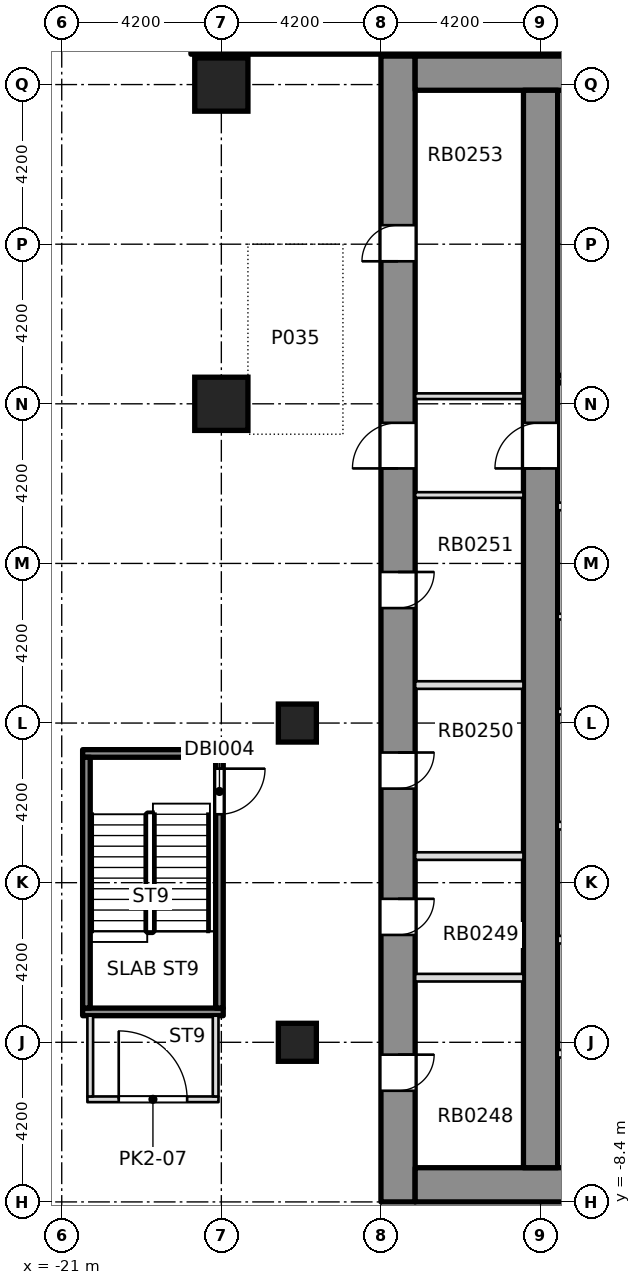
"""IFC4 building model, lengths in metres.
Left out: names, types, materials, properties, quantities, classifications, styles, units other than length and angle.
Written with IfcOpenShell. Run it as: python <this file> out.ifc"""

import sys

from ifc_helpers import new_model, si_unit, direction, frame, frame_2d, origin, origin_2d, place, context, subcontext, project, spatial, polyline, rectangle, outline, extrude, element, fill, save


model = new_model("IFC4")
c1 = context("Model", 3, precision=1e-05, world=origin(), true_north=direction((0.0, 1.0)))
c2 = subcontext(c1, "Body", "Model", "MODEL_VIEW")
j1 = project(units=[si_unit("LENGTHUNIT", "METRE"), si_unit("PLANEANGLEUNIT", "RADIAN")], contexts=[c1])
p1 = place(None, origin())
s1 = spatial("IfcSite", under=j1, at=p1, CompositionType="ELEMENT")
p2 = place(p1, origin())
s2 = spatial("IfcBuilding", under=s1, at=p2, CompositionType="ELEMENT")
p3 = place(p2, frame((0.0, 0.0, -8.4)))
s3 = spatial("IfcBuildingStorey", under=s2, at=p3, CompositionType="ELEMENT", Elevation=-8.4)
p4 = place(p3, frame((-12.15, -8.4, 0.0), z_axis=(0.0, 0.0, 1.0), x_axis=(0.0, 1.0, 0.0)))
e1 = element("IfcWall", 1, at=p4, inside=s3, PredefinedType="SHEAR", context=c2, shape_type="SweptSolid", body=[
    extrude(rectangle(XDim=30.15, YDim=0.9, at=frame_2d((15.075, 0.0))), origin(), (0.0, 0.0, 1.0), 3.85),
])
p5 = place(p4, frame((2.925, 0.0, 0.0)))
e2 = element("IfcOpeningElement", 2, at=p5, cuts=e1, PredefinedType="OPENING", context=c2, shape_type="SweptSolid", body=[
    extrude(rectangle(XDim=0.95, YDim=2.1, at=frame_2d((0.475, 1.05))), frame((0.0, 0.46, 0.0), z_axis=(0.0, -1.0, 0.0), x_axis=(1.0, 0.0, 0.0)), (0.0, 0.0, 1.0), 0.92),
])
p6 = place(p4, frame((7.025, 0.0, 0.0)))
e3 = element("IfcOpeningElement", 3, at=p6, cuts=e1, PredefinedType="OPENING", context=c2, shape_type="SweptSolid", body=[
    extrude(rectangle(XDim=0.95, YDim=2.1, at=frame_2d((0.475, 1.05))), frame((0.0, 0.46, 0.0), z_axis=(0.0, -1.0, 0.0), x_axis=(1.0, 0.0, 0.0)), (0.0, 0.0, 1.0), 0.92),
])
p7 = place(p4, frame((10.875, 0.0, 0.0)))
e4 = element("IfcOpeningElement", 4, at=p7, cuts=e1, PredefinedType="OPENING", context=c2, shape_type="SweptSolid", body=[
    extrude(rectangle(XDim=0.95, YDim=2.1, at=frame_2d((0.475, 1.05))), frame((0.0, 0.46, 0.0), z_axis=(0.0, -1.0, 0.0), x_axis=(1.0, 0.0, 0.0)), (0.0, 0.0, 1.0), 0.92),
])
p8 = place(p4, frame((15.625, 0.0, 0.0)))
e5 = element("IfcOpeningElement", 5, at=p8, cuts=e1, PredefinedType="OPENING", context=c2, shape_type="SweptSolid", body=[
    extrude(rectangle(XDim=0.95, YDim=2.1, at=frame_2d((0.475, 1.05))), frame((0.0, 0.46, 0.0), z_axis=(0.0, -1.0, 0.0), x_axis=(1.0, 0.0, 0.0)), (0.0, 0.0, 1.0), 0.92),
])
p9 = place(p4, frame((24.75, 0.0, 0.0)))
e6 = element("IfcOpeningElement", 6, at=p9, cuts=e1, PredefinedType="OPENING", context=c2, shape_type="SweptSolid", body=[
    extrude(rectangle(XDim=0.95, YDim=2.1, at=frame_2d((0.475, 1.05))), frame((0.0, 0.46, 0.0), z_axis=(0.0, -1.0, 0.0), x_axis=(1.0, 0.0, 0.0)), (0.0, 0.0, 1.0), 0.92),
])
p10 = place(p4, frame((19.3, 0.0, 0.0)))
e7 = element("IfcOpeningElement", 7, at=p10, cuts=e1, PredefinedType="OPENING", context=c2, shape_type="SweptSolid", body=[
    extrude(rectangle(XDim=1.2, YDim=2.1, at=frame_2d((0.6, 1.05))), frame((0.0, 0.46, 0.0), z_axis=(0.0, -1.0, 0.0), x_axis=(1.0, 0.0, 0.0)), (0.0, 0.0, 1.0), 0.92),
])
p11 = place(p3, frame((-11.7, -7.95, 0.0), z_axis=(0.0, 0.0, 1.0), x_axis=(1.0, 0.0, 0.0)))
e8 = element("IfcWall", 8, at=p11, inside=s3, PredefinedType="SHEAR", context=c2, shape_type="SweptSolid", body=[
    extrude(rectangle(XDim=23.4, YDim=0.9, at=frame_2d((11.7, 0.0))), origin(), (0.0, 0.0, 1.0), 3.85),
])
p12 = place(p11, frame((6.95, 0.0, 0.0)))
e9 = element("IfcOpeningElement", 9, at=p12, cuts=e8, PredefinedType="OPENING", context=c2, shape_type="SweptSolid", body=[
    extrude(rectangle(XDim=1.8, YDim=2.1, at=frame_2d((0.9, 1.05))), frame((0.0, 0.46, 0.0), z_axis=(0.0, -1.0, 0.0), x_axis=(1.0, 0.0, 0.0)), (0.0, 0.0, 1.0), 0.92),
])
p13 = place(p11, frame((14.65, 0.0, 0.0)))
e10 = element("IfcOpeningElement", 10, at=p13, cuts=e8, PredefinedType="OPENING", context=c2, shape_type="SweptSolid", body=[
    extrude(rectangle(XDim=1.8, YDim=2.1, at=frame_2d((0.9, 1.05))), frame((0.0, 0.46, 0.0), z_axis=(0.0, -1.0, 0.0), x_axis=(1.0, 0.0, 0.0)), (0.0, 0.0, 1.0), 0.92),
])
p14 = place(p3, frame((-11.7, 21.3, 0.0), z_axis=(0.0, 0.0, 1.0), x_axis=(1.0, 0.0, 0.0)))
e11 = element("IfcWall", 11, at=p14, inside=s3, PredefinedType="SOLIDWALL", context=c2, shape_type="SweptSolid", body=[
    extrude(rectangle(XDim=23.4, YDim=0.9, at=frame_2d((11.7, 0.0))), origin(), (0.0, 0.0, 1.0), 3.85),
])
p15 = place(p3, frame((-8.4, -7.5, 0.0), z_axis=(0.0, 0.0, 1.0), x_axis=(0.0, 1.0, 0.0)))
e12 = element("IfcWall", 12, at=p15, inside=s3, PredefinedType="SHEAR", context=c2, shape_type="SweptSolid", body=[
    extrude(rectangle(XDim=28.35, YDim=0.9, at=frame_2d((14.175, 0.0))), origin(), (0.0, 0.0, 1.0), 3.85),
])
p16 = place(p15, frame((18.4, 0.0, 0.0)))
e13 = element("IfcOpeningElement", 13, at=p16, cuts=e12, PredefinedType="OPENING", context=c2, shape_type="SweptSolid", body=[
    extrude(rectangle(XDim=1.2, YDim=2.1, at=frame_2d((0.6, 1.05))), frame((0.0, 0.46, 0.0), z_axis=(0.0, -1.0, 0.0), x_axis=(1.0, 0.0, 0.0)), (0.0, 0.0, 1.0), 0.92),
])
for number, where, z_axis, x_axis in (
    (14, (-16.8, 12.6, 0.0), (0.0, 0.0, 1.0), (1.0, 0.0, 0.0)),
    (15, (-16.8, 21.0, 0.0), (0.0, 0.0, 1.0), (1.0, 0.0, 0.0)),
):
    element("IfcColumn", number, at=place(p3, frame(where, z_axis=z_axis, x_axis=x_axis)), inside=s3, PredefinedType="COLUMN", context=c2, shape_type="SweptSolid", body=[
        extrude(rectangle(XDim=1.4, YDim=1.4, at=origin_2d()), origin(), (0.0, 0.0, 1.0), 3.85),
    ])
for number, where, z_axis, x_axis in (
    (16, (-14.8, -4.2, 0.0), (0.0, 0.0, 1.0), (1.0, 0.0, 0.0)),
    (17, (-14.8, 4.2, 0.0), (0.0, 0.0, 1.0), (1.0, 0.0, 0.0)),
):
    element("IfcColumn", number, at=place(p3, frame(where, z_axis=z_axis, x_axis=x_axis)), inside=s3, PredefinedType="COLUMN", context=c2, shape_type="SweptSolid", body=[
        extrude(rectangle(XDim=1.0, YDim=1.0, at=origin_2d()), origin(), (0.0, 0.0, 1.0), 3.85),
    ])
p17 = place(p3, frame((-20.325, -5.7, 0.0), z_axis=(0.0, 0.0, 1.0), x_axis=(1.0, 0.0, 0.0)))
e18 = element("IfcWall", 18, at=p17, inside=s3, PredefinedType="PARTITIONING", context=c2, shape_type="SweptSolid", body=[
    extrude(rectangle(XDim=3.45, YDim=0.15, at=frame_2d((1.725, 0.0))), origin(), (0.0, 0.0, 1.0), 3.85),
])
p18 = place(p17, frame((0.825, 0.0, 0.0)))
e19 = element("IfcOpeningElement", 19, at=p18, cuts=e18, PredefinedType="OPENING", context=c2, shape_type="SweptSolid", body=[
    extrude(rectangle(XDim=1.8, YDim=2.1, at=frame_2d((0.9, 1.05))), frame((0.0, 0.085, 0.0), z_axis=(0.0, -1.0, 0.0), x_axis=(1.0, 0.0, 0.0)), (0.0, 0.0, 1.0), 0.17),
])
for number, where, z_axis, x_axis in (
    (20, (-20.25, -5.625, 0.0), (0.0, 0.0, 1.0), (0.0, 1.0, 0.0)),
    (21, (-16.95, -5.625, 0.0), (0.0, 0.0, 1.0), (0.0, 1.0, 0.0)),
):
    element("IfcWall", number, at=place(p3, frame(where, z_axis=z_axis, x_axis=x_axis)), inside=s3, PredefinedType="PARTITIONING", context=c2, shape_type="SweptSolid", body=[
        extrude(rectangle(XDim=2.125, YDim=0.15, at=frame_2d((1.062, 0.0))), origin(), (0.0, 0.0, 1.0), 3.85),
    ])
p19 = place(p3, frame((-17.6, 22.0, 0.0), z_axis=(0.0, 0.0, 1.0), x_axis=(1.0, 0.0, 0.0)))
e22 = element("IfcWall", 22, at=p19, inside=s3, PredefinedType="SOLIDWALL", context=c2, shape_type="SweptSolid", body=[
    extrude(outline(polyline([(0.0, 0.0), (35.2, 0.0), (35.2, 3.9), (34.6, 3.899), (32.2, 3.702), (3.0, -0.105), (0.0, -0.301), (0.0, 0.0)])), frame((0.0, 0.2, 0.0), z_axis=(0.0, -1.0, 0.0), x_axis=(1.0, 0.0, 0.0)), (0.0, 0.0, 1.0), 0.4),
])
for number, where, z_axis, x_axis in (
    (23, (-7.949, -4.5, 0.0), (0.0, 0.0, 1.0), (1.0, 0.0, 0.0)),
    (24, (-7.949, -1.5, 0.0), (0.0, 0.0, 1.0), (1.0, 0.0, 0.0)),
    (25, (-7.949, 1.5, 0.0), (0.0, 0.0, 1.0), (1.0, 0.0, 0.0)),
):
    element("IfcWall", number, at=place(p3, frame(where, z_axis=z_axis, x_axis=x_axis)), inside=s3, PredefinedType="PARTITIONING", context=c2, shape_type="SweptSolid", body=[
        extrude(rectangle(XDim=2.374, YDim=0.2, at=frame_2d((1.187, 0.0))), origin(), (0.0, 0.0, 1.0), 3.85),
    ])
p20 = place(p3, frame((-7.949, 4.5, 0.0), z_axis=(0.0, 0.0, 1.0), x_axis=(1.0, 0.0, 0.0)))
e26 = element("IfcWall", 26, at=p20, inside=s3, PredefinedType="PARTITIONING", context=c2, shape_type="SweptSolid", body=[
    extrude(rectangle(XDim=2.524, YDim=0.15, at=frame_2d((1.262, 0.0))), origin(), (0.0, 0.0, 1.0), 3.85),
])
p21 = place(p3, frame((-7.949, 7.0, 0.0), z_axis=(0.0, 0.0, 1.0), x_axis=(1.0, 0.0, 0.0)))
e27 = element("IfcWall", 27, at=p21, inside=s3, PredefinedType="PARTITIONING", context=c2, shape_type="SweptSolid", body=[
    extrude(rectangle(XDim=15.898, YDim=0.15, at=frame_2d((7.949, 0.0))), origin(), (0.0, 0.0, 1.0), 3.85),
])
p22 = place(p21, frame((7.249, 0.0, 0.0)))
e28 = element("IfcOpeningElement", 28, at=p22, cuts=e27, PredefinedType="OPENING", context=c2, shape_type="SweptSolid", body=[
    extrude(rectangle(XDim=1.4, YDim=2.1, at=frame_2d((0.7, 1.05))), frame((0.0, 0.085, 0.0), z_axis=(0.0, -1.0, 0.0), x_axis=(1.0, 0.0, 0.0)), (0.0, 0.0, 1.0), 0.17),
])
p23 = place(p3, frame((-7.949, 9.9, 0.0), z_axis=(0.0, 0.0, 1.0), x_axis=(1.0, 0.0, 0.0)))
e29 = element("IfcWall", 29, at=p23, inside=s3, PredefinedType="PARTITIONING", context=c2, shape_type="SweptSolid", body=[
    extrude(rectangle(XDim=4.349, YDim=0.2, at=frame_2d((2.174, 0.0))), origin(), (0.0, 0.0, 1.0), 3.85),
])
p24 = place(p23, frame((0.999, 0.0, 0.0)))
e30 = element("IfcOpeningElement", 30, at=p24, cuts=e29, PredefinedType="OPENING", context=c2, shape_type="SweptSolid", body=[
    extrude(rectangle(XDim=1.1, YDim=2.1, at=frame_2d((0.55, 1.05))), frame((0.0, 0.11, 0.0), z_axis=(0.0, -1.0, 0.0), x_axis=(1.0, 0.0, 0.0)), (0.0, 0.0, 1.0), 0.22),
])
p25 = place(p3, frame((-7.949, 13.25, 0.0), z_axis=(0.0, 0.0, 1.0), x_axis=(1.0, 0.0, 0.0)))
e31 = element("IfcWall", 31, at=p25, inside=s3, PredefinedType="SOLIDWALL", context=c2, shape_type="SweptSolid", body=[
    extrude(rectangle(XDim=4.524, YDim=0.2, at=frame_2d((2.262, 0.0))), origin(), (0.0, 0.0, 1.0), 3.85),
])
p26 = place(p25, frame((1.499, 0.0, 0.0)))
e32 = element("IfcOpeningElement", 32, at=p26, cuts=e31, PredefinedType="OPENING", context=c2, shape_type="SweptSolid", body=[
    extrude(rectangle(XDim=1.2, YDim=2.1, at=frame_2d((0.6, 1.05))), frame((0.0, 0.11, 0.0), z_axis=(0.0, -1.0, 0.0), x_axis=(1.0, 0.0, 0.0)), (0.0, 0.0, 1.0), 0.22),
])
for number, where, z_axis, x_axis in (
    (33, (-11.699, -2.5, 0.0), (0.0, 0.0, 1.0), (1.0, 0.0, 0.0)),
    (34, (-11.699, 0.7, 0.0), (0.0, 0.0, 1.0), (1.0, 0.0, 0.0)),
    (35, (-11.699, 5.2, 0.0), (0.0, 0.0, 1.0), (1.0, 0.0, 0.0)),
):
    element("IfcWall", number, at=place(p3, frame(where, z_axis=z_axis, x_axis=x_axis)), inside=s3, PredefinedType="PARTITIONING", context=c2, shape_type="SweptSolid", body=[
        extrude(rectangle(XDim=2.848, YDim=0.2, at=frame_2d((1.424, 0.0))), origin(), (0.0, 0.0, 1.0), 3.85),
    ])
for number, where, z_axis, x_axis in (
    (36, (-11.699, 10.2, 0.0), (0.0, 0.0, 1.0), (1.0, 0.0, 0.0)),
    (37, (-11.699, 12.8, 0.0), (0.0, 0.0, 1.0), (1.0, 0.0, 0.0)),
):
    element("IfcWall", number, at=place(p3, frame(where, z_axis=z_axis, x_axis=x_axis)), inside=s3, PredefinedType="PARTITIONING", context=c2, shape_type="SweptSolid", body=[
        extrude(rectangle(XDim=2.848, YDim=0.15, at=frame_2d((1.424, 0.0))), origin(), (0.0, 0.0, 1.0), 3.85),
    ])
for number, where, z_axis, x_axis in (
    (38, (-20.45, -3.4, 0.0), (0.0, 0.0, 1.0), (1.0, 0.0, 0.0)),
    (39, (-20.45, 3.4, 0.0), (0.0, 0.0, 1.0), (1.0, 0.0, 0.0)),
):
    element("IfcWall", number, at=place(p3, frame(where, z_axis=z_axis, x_axis=x_axis)), inside=s3, PredefinedType="SOLIDWALL", context=c2, shape_type="SweptSolid", body=[
        extrude(rectangle(XDim=3.7, YDim=0.2, at=frame_2d((1.85, 0.0))), origin(), (0.0, 0.0, 1.0), 3.85),
    ])
p27 = place(p3, frame((-20.35, -3.3, 0.0), z_axis=(0.0, 0.0, 1.0), x_axis=(0.0, 1.0, 0.0)))
e40 = element("IfcWall", 40, at=p27, inside=s3, PredefinedType="SOLIDWALL", context=c2, shape_type="SweptSolid", body=[
    extrude(rectangle(XDim=6.6, YDim=0.2, at=frame_2d((3.3, 0.0))), origin(), (0.0, 0.0, 1.0), 3.85),
])
p28 = place(p3, frame((-16.85, -3.3, 0.0), z_axis=(0.0, 0.0, 1.0), x_axis=(0.0, 1.0, 0.0)))
e41 = element("IfcWall", 41, at=p28, inside=s3, PredefinedType="SOLIDWALL", context=c2, shape_type="SweptSolid", body=[
    extrude(rectangle(XDim=6.6, YDim=0.2, at=frame_2d((3.3, 0.0))), origin(), (0.0, 0.0, 1.0), 3.85),
])
p29 = place(p28, frame((5.1, 0.0, 0.0)))
e42 = element("IfcOpeningElement", 42, at=p29, cuts=e41, PredefinedType="OPENING", context=c2, shape_type="SweptSolid", body=[
    extrude(rectangle(XDim=1.2, YDim=2.1, at=frame_2d((0.6, 1.05))), frame((0.0, 0.11, 0.0), z_axis=(0.0, -1.0, 0.0), x_axis=(1.0, 0.0, 0.0)), (0.0, 0.0, 1.0), 0.22),
])
p30 = place(p18, origin())
e43 = element("IfcDoor", 43, at=p30, inside=s3, OperationType="DOUBLE_DOOR_SINGLE_SWING", PredefinedType="DOOR", context=c2, shape_type="SweptSolid", body=[
    extrude(rectangle(XDim=1.8, YDim=2.1, at=frame_2d((0.9, 1.05))), frame((0.0, 0.025, 0.0), z_axis=(0.0, -1.0, 0.0), x_axis=(1.0, 0.0, 0.0)), (0.0, 0.0, 1.0), 0.05),
])
fill(e19, e43)
p31 = place(p5, origin())
e44 = element("IfcDoor", 44, at=p31, inside=s3, OperationType="SINGLE_SWING_LEFT", PredefinedType="DOOR", context=c2, shape_type="SweptSolid", body=[
    extrude(rectangle(XDim=0.95, YDim=2.1, at=frame_2d((0.475, 1.05))), frame((0.0, 0.025, 0.0), z_axis=(0.0, -1.0, 0.0), x_axis=(1.0, 0.0, 0.0)), (0.0, 0.0, 1.0), 0.05),
])
fill(e2, e44)
p32 = place(p6, origin())
e45 = element("IfcDoor", 45, at=p32, inside=s3, OperationType="SINGLE_SWING_LEFT", PredefinedType="DOOR", context=c2, shape_type="SweptSolid", body=[
    extrude(rectangle(XDim=0.95, YDim=2.1, at=frame_2d((0.475, 1.05))), frame((0.0, 0.025, 0.0), z_axis=(0.0, -1.0, 0.0), x_axis=(1.0, 0.0, 0.0)), (0.0, 0.0, 1.0), 0.05),
])
fill(e3, e45)
p33 = place(p7, origin())
e46 = element("IfcDoor", 46, at=p33, inside=s3, OperationType="SINGLE_SWING_LEFT", PredefinedType="DOOR", context=c2, shape_type="SweptSolid", body=[
    extrude(rectangle(XDim=0.95, YDim=2.1, at=frame_2d((0.475, 1.05))), frame((0.0, 0.025, 0.0), z_axis=(0.0, -1.0, 0.0), x_axis=(1.0, 0.0, 0.0)), (0.0, 0.0, 1.0), 0.05),
])
fill(e4, e46)
p34 = place(p8, origin())
e47 = element("IfcDoor", 47, at=p34, inside=s3, OperationType="SINGLE_SWING_LEFT", PredefinedType="DOOR", context=c2, shape_type="SweptSolid", body=[
    extrude(rectangle(XDim=0.95, YDim=2.1, at=frame_2d((0.475, 1.05))), frame((0.0, 0.025, 0.0), z_axis=(0.0, -1.0, 0.0), x_axis=(1.0, 0.0, 0.0)), (0.0, 0.0, 1.0), 0.05),
])
fill(e5, e47)
p35 = place(p9, origin())
e48 = element("IfcDoor", 48, at=p35, inside=s3, OperationType="SINGLE_SWING_LEFT", PredefinedType="DOOR", context=c2, shape_type="SweptSolid", body=[
    extrude(rectangle(XDim=0.95, YDim=2.1, at=frame_2d((0.475, 1.05))), frame((0.0, 0.025, 0.0), z_axis=(0.0, -1.0, 0.0), x_axis=(1.0, 0.0, 0.0)), (0.0, 0.0, 1.0), 0.05),
])
fill(e6, e48)
p36 = place(p10, origin())
e49 = element("IfcDoor", 49, at=p36, inside=s3, OperationType="SINGLE_SWING_LEFT", PredefinedType="DOOR", context=c2, shape_type="SweptSolid", body=[
    extrude(rectangle(XDim=1.2, YDim=2.1, at=frame_2d((0.6, 1.05))), frame((0.0, 0.025, 0.0), z_axis=(0.0, -1.0, 0.0), x_axis=(1.0, 0.0, 0.0)), (0.0, 0.0, 1.0), 0.05),
])
fill(e7, e49)
p37 = place(p16, origin())
e50 = element("IfcDoor", 50, at=p37, inside=s3, OperationType="SINGLE_SWING_LEFT", PredefinedType="DOOR", context=c2, shape_type="SweptSolid", body=[
    extrude(rectangle(XDim=1.2, YDim=2.1, at=frame_2d((0.6, 1.05))), frame((0.0, 0.025, 0.0), z_axis=(0.0, -1.0, 0.0), x_axis=(1.0, 0.0, 0.0)), (0.0, 0.0, 1.0), 0.05),
])
fill(e13, e50)
p38 = place(p29, origin())
e51 = element("IfcDoor", 51, at=p38, inside=s3, OperationType="SINGLE_SWING_LEFT", PredefinedType="DOOR", context=c2, shape_type="SweptSolid", body=[
    extrude(rectangle(XDim=1.2, YDim=2.1, at=frame_2d((0.6, 1.05))), frame((0.0, 0.025, 0.0), z_axis=(0.0, -1.0, 0.0), x_axis=(1.0, 0.0, 0.0)), (0.0, 0.0, 1.0), 0.05),
])
fill(e42, e51)
save(model, sys.argv[1])
